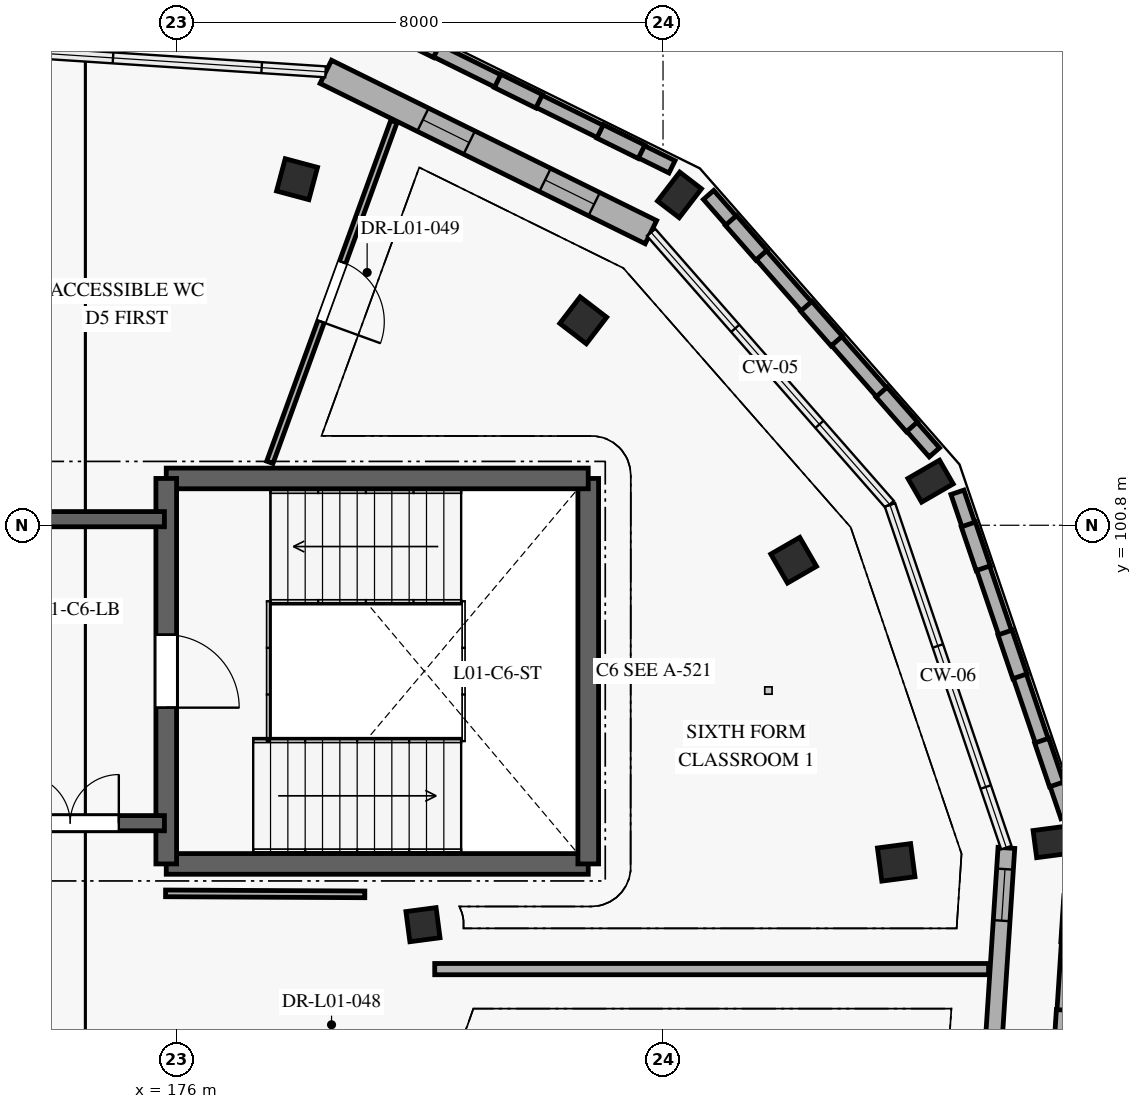
"""IFC4 building model, lengths in metres.
Left out: names, types, materials, properties, quantities, classifications, styles, units other than length and angle.
Written with IfcOpenShell. Run it as: python <this file> out.ifc"""

import sys

from ifc_helpers import new_model, si_unit, direction, frame, frame_2d, origin, origin_2d, place, context, subcontext, project, spatial, rectangle, extrude, element, fill, save


model = new_model("IFC4")
c1 = context("Model", 3, precision=1e-05, world=origin(), true_north=direction((0.0, 1.0)))
c2 = subcontext(c1, "Body", "Model", "MODEL_VIEW")
j1 = project(units=[si_unit("LENGTHUNIT", "METRE"), si_unit("PLANEANGLEUNIT", "RADIAN")], contexts=[c1])
p1 = place(None, origin())
s1 = spatial("IfcSite", under=j1, at=p1, CompositionType="ELEMENT")
p2 = place(p1, origin())
s2 = spatial("IfcBuilding", under=s1, at=p2, CompositionType="ELEMENT")
p3 = place(p2, frame((0.0, 0.0, 4.2)))
s3 = spatial("IfcBuildingStorey", under=s2, at=p3, CompositionType="ELEMENT", Elevation=4.2)
for number, where, z_axis, x_axis in (
    (1, (190.413, 95.595, 0.0), (0.0, 0.0, 1.0), (-0.131, 0.991, 0.0)),
    (2, (188.4, 101.525, 0.0), (0.0, 0.0, 1.0), (-0.5, 0.866, 0.0)),
    (3, (184.271, 106.233, 0.0), (0.0, 0.0, 1.0), (-0.793, 0.609, 0.0)),
):
    element("IfcColumn", number, at=place(p3, frame(where, z_axis=z_axis, x_axis=x_axis)), inside=s3, PredefinedType="PILASTER", context=c2, shape_type="SweptSolid", body=[
        extrude(rectangle(XDim=0.45, YDim=0.6, at=origin_2d()), origin(), (0.0, 0.0, 1.0), 4.2),
    ])
for number, where, z_axis, x_axis in (
    (4, (187.835, 95.256, 0.0), (0.0, 0.0, 1.0), (-0.131, 0.991, 0.0)),
    (5, (186.148, 100.225, 0.0), (0.0, 0.0, 1.0), (-0.5, 0.866, 0.0)),
    (6, (182.688, 104.171, 0.0), (0.0, 0.0, 1.0), (-0.793, 0.609, 0.0)),
    (7, (177.981, 106.492, 0.0), (0.0, 0.0, 1.0), (-0.966, 0.259, 0.0)),
):
    element("IfcColumn", number, at=place(p3, frame(where, z_axis=z_axis, x_axis=x_axis)), inside=s3, PredefinedType="COLUMN", context=c2, shape_type="SweptSolid", body=[
        extrude(rectangle(XDim=0.55, YDim=0.55, at=origin_2d()), origin(), (0.0, 0.0, 1.0), 4.2),
    ])
p4 = place(p3, frame((180.052, 94.231, 0.0), z_axis=(0.0, 0.0, 1.0), x_axis=(0.991444861374, 0.13052619222, 0.0)))
e8 = element("IfcColumn", 8, at=p4, inside=s3, PredefinedType="COLUMN", context=c2, shape_type="SweptSolid", body=[
    extrude(rectangle(XDim=0.5, YDim=0.5, at=origin_2d()), origin(), (0.0, 0.0, 1.0), 4.2),
])
p5 = place(p3, frame((178.454, 108.257, 0.0), z_axis=(0.0, 0.0, 1.0), x_axis=(0.896879104746, -0.442275786664, 0.0)))
e9 = element("IfcWall", 9, at=p5, inside=s3, PredefinedType="SOLIDWALL", context=c2, shape_type="SweptSolid", body=[
    extrude(rectangle(XDim=5.961, YDim=0.425, at=frame_2d((2.98, 0.0))), origin(), (0.0, 0.0, 1.0), 3.94),
])
p6 = place(p5, frame((1.781, 0.0, 0.85)))
e10 = element("IfcOpeningElement", 10, at=p6, cuts=e9, PredefinedType="OPENING", context=c2, shape_type="SweptSolid", body=[
    extrude(rectangle(XDim=0.85, YDim=1.4, at=frame_2d((0.425, 0.7))), frame((0.0, 0.222, 0.0), z_axis=(0.0, -1.0, 0.0), x_axis=(1.0, 0.0, 0.0)), (0.0, 0.0, 1.0), 0.445),
])
p7 = place(p5, frame((4.021, 0.0, 0.85)))
e11 = element("IfcOpeningElement", 11, at=p7, cuts=e9, PredefinedType="OPENING", context=c2, shape_type="SweptSolid", body=[
    extrude(rectangle(XDim=0.9, YDim=1.6, at=frame_2d((0.45, 0.8))), frame((0.0, 0.222, 0.0), z_axis=(0.0, -1.0, 0.0), x_axis=(1.0, 0.0, 0.0)), (0.0, 0.0, 1.0), 0.445),
])
p8 = place(p3, frame((189.647, 95.494, 0.0), z_axis=(0.0, 0.0, 1.0), x_axis=(-0.065407169492, -0.997858658418, 0.0)))
e12 = element("IfcWall", 12, at=p8, inside=s3, PredefinedType="SOLIDWALL", context=c2, shape_type="SweptSolid", body=[
    extrude(rectangle(XDim=5.961, YDim=0.275, at=frame_2d((2.98, 0.0))), origin(), (0.0, 0.0, 1.0), 3.94),
])
p9 = place(p8, frame((0.35, 0.0, 0.85)))
e13 = element("IfcOpeningElement", 13, at=p9, cuts=e12, PredefinedType="OPENING", context=c2, shape_type="SweptSolid", body=[
    extrude(rectangle(XDim=0.85, YDim=1.4, at=frame_2d((0.425, 0.7))), frame((0.0, 0.147, 0.0), z_axis=(0.0, -1.0, 0.0), x_axis=(1.0, 0.0, 0.0)), (0.0, 0.0, 1.0), 0.295),
])
p10 = place(p8, frame((4.021, 0.0, 0.85)))
e14 = element("IfcOpeningElement", 14, at=p10, cuts=e12, PredefinedType="OPENING", context=c2, shape_type="SweptSolid", body=[
    extrude(rectangle(XDim=0.9, YDim=1.8, at=frame_2d((0.45, 0.9))), frame((0.0, 0.147, 0.0), z_axis=(0.0, -1.0, 0.0), x_axis=(1.0, 0.0, 0.0)), (0.0, 0.0, 1.0), 0.295),
])
p11 = place(p3, frame((190.652, 96.009, 0.0), z_axis=(0.0, 0.0, 1.0), x_axis=(-0.321450435893, 0.946926405411, 0.0)))
e15 = element("IfcWall", 15, at=p11, inside=s3, PredefinedType="ELEMENTEDWALL", context=c2, shape_type="SweptSolid", body=[
    extrude(rectangle(XDim=5.632, YDim=0.225, at=frame_2d((2.816, 0.0))), origin(), (0.0, 0.0, 1.0), 1.09),
])
for number, where, z_axis, x_axis in (
    (16, (190.472, 96.538, 1.09), (0.0, 0.0, 1.0), (-0.322, 0.947, 0.0)),
    (17, (189.869, 98.316, 1.09), (0.0, 0.0, 1.0), (-0.321, 0.947, 0.0)),
):
    element("IfcWall", number, at=place(p3, frame(where, z_axis=z_axis, x_axis=x_axis)), inside=s3, PredefinedType="ELEMENTEDWALL", context=c2, shape_type="SweptSolid", body=[
        extrude(rectangle(XDim=0.76, YDim=0.245, at=frame_2d((0.38, 0.0))), origin(), (0.0, 0.0, 1.0), 2.85),
    ])
p12 = place(p3, frame((189.265, 100.094, 1.09), z_axis=(0.0, 0.0, 1.0), x_axis=(-0.321620473335, 0.946868666253, 0.0)))
e18 = element("IfcWall", 18, at=p12, inside=s3, PredefinedType="ELEMENTEDWALL", context=c2, shape_type="SweptSolid", body=[
    extrude(rectangle(XDim=0.76, YDim=0.245, at=frame_2d((0.38, 0.0))), origin(), (0.0, 0.0, 1.0), 2.85),
])
p13 = place(p3, frame((188.462, 101.999, 0.0), z_axis=(0.0, 0.0, 1.0), x_axis=(-0.659363462551, 0.751824330714, 0.0)))
e19 = element("IfcWall", 19, at=p13, inside=s3, PredefinedType="ELEMENTEDWALL", context=c2, shape_type="SweptSolid", body=[
    extrude(rectangle(XDim=5.632, YDim=0.225, at=frame_2d((2.816, 0.0))), origin(), (0.0, 0.0, 1.0), 1.09),
])
p14 = place(p3, frame((188.094, 102.419, 1.09), z_axis=(0.0, 0.0, 1.0), x_axis=(-0.659323125798, 0.751859704857, 0.0)))
e20 = element("IfcWall", 20, at=p14, inside=s3, PredefinedType="ELEMENTEDWALL", context=c2, shape_type="SweptSolid", body=[
    extrude(rectangle(XDim=0.76, YDim=0.245, at=frame_2d((0.38, 0.0))), origin(), (0.0, 0.0, 1.0), 2.85),
])
p15 = place(p3, frame((186.856, 103.83, 1.09), z_axis=(0.0, 0.0, 1.0), x_axis=(-0.659345470196, 0.751840109951, 0.0)))
e21 = element("IfcWall", 21, at=p15, inside=s3, PredefinedType="ELEMENTEDWALL", context=c2, shape_type="SweptSolid", body=[
    extrude(rectangle(XDim=0.76, YDim=0.245, at=frame_2d((0.38, 0.0))), origin(), (0.0, 0.0, 1.0), 2.85),
])
p16 = place(p3, frame((185.618, 105.242, 1.09), z_axis=(0.0, 0.0, 1.0), x_axis=(-0.659504701015, 0.751700438565, 0.0)))
e22 = element("IfcWall", 22, at=p16, inside=s3, PredefinedType="ELEMENTEDWALL", context=c2, shape_type="SweptSolid", body=[
    extrude(rectangle(XDim=0.76, YDim=0.245, at=frame_2d((0.38, 0.0))), origin(), (0.0, 0.0, 1.0), 2.85),
])
p17 = place(p3, frame((184.147, 106.695, 0.0), z_axis=(0.0, 0.0, 1.0), x_axis=(-0.896858387366, 0.442317796398, 0.0)))
e23 = element("IfcWall", 23, at=p17, inside=s3, PredefinedType="ELEMENTEDWALL", context=c2, shape_type="SweptSolid", body=[
    extrude(rectangle(XDim=5.633, YDim=0.225, at=frame_2d((2.816, 0.0))), origin(), (0.0, 0.0, 1.0), 1.09),
])
for number, where, z_axis, x_axis in (
    (24, (183.646, 106.942, 1.09), (0.0, 0.0, 1.0), (-0.897, 0.442, 0.0)),
    (25, (181.962, 107.772, 1.09), (0.0, 0.0, 1.0), (-0.897, 0.442, 0.0)),
    (26, (180.278, 108.603, 1.09), (0.0, 0.0, 1.0), (-0.897, 0.442, 0.0)),
):
    element("IfcWall", number, at=place(p3, frame(where, z_axis=z_axis, x_axis=x_axis)), inside=s3, PredefinedType="ELEMENTEDWALL", context=c2, shape_type="SweptSolid", body=[
        extrude(rectangle(XDim=0.76, YDim=0.245, at=frame_2d((0.38, 0.0))), origin(), (0.0, 0.0, 1.0), 2.85),
    ])
p18 = place(p3, frame((190.382, 89.637, 0.0), z_axis=(0.0, 0.0, 1.0), x_axis=(0.065408478609, 0.997858572607, 0.0)))
e27 = element("IfcWall", 27, at=p18, inside=s3, PredefinedType="ELEMENTEDWALL", context=c2, shape_type="SweptSolid", body=[
    extrude(rectangle(XDim=5.632, YDim=0.225, at=frame_2d((2.816, 0.0))), origin(), (0.0, 0.0, 1.0), 1.09),
])
for number, where, z_axis, x_axis in (
    (28, (190.542, 92.068, 1.09), (0.0, 0.0, 1.0), (0.066, 0.998, 0.0)),
    (29, (190.665, 93.941, 1.09), (0.0, 0.0, 1.0), (0.066, 0.998, 0.0)),
):
    element("IfcWall", number, at=place(p3, frame(where, z_axis=z_axis, x_axis=x_axis)), inside=s3, PredefinedType="ELEMENTEDWALL", context=c2, shape_type="SweptSolid", body=[
        extrude(rectangle(XDim=0.76, YDim=0.245, at=frame_2d((0.38, 0.0))), origin(), (0.0, 0.0, 1.0), 2.85),
    ])
p19 = place(p3, frame((175.83, 95.23, 0.0), z_axis=(0.0, 0.0, 1.0), x_axis=(1.0, 0.0, 0.0)))
e30 = element("IfcWall", 30, at=p19, inside=s3, PredefinedType="SHEAR", context=c2, shape_type="SweptSolid", body=[
    extrude(rectangle(XDim=6.94, YDim=0.34, at=frame_2d((3.47, 0.0))), origin(), (0.0, 0.0, 1.0), 3.95),
])
p20 = place(p3, frame((182.77, 95.23, 0.0), z_axis=(0.0, 0.0, 1.0), x_axis=(0.0, 1.0, 0.0)))
e31 = element("IfcWall", 31, at=p20, inside=s3, PredefinedType="SHEAR", context=c2, shape_type="SweptSolid", body=[
    extrude(rectangle(XDim=6.34, YDim=0.34, at=frame_2d((3.17, 0.0))), origin(), (0.0, 0.0, 1.0), 3.95),
])
p21 = place(p3, frame((182.77, 101.57, 0.0), z_axis=(0.0, 0.0, 1.0), x_axis=(-1.0, 0.0, 0.0)))
e32 = element("IfcWall", 32, at=p21, inside=s3, PredefinedType="SHEAR", context=c2, shape_type="SweptSolid", body=[
    extrude(rectangle(XDim=6.94, YDim=0.34, at=frame_2d((3.47, 0.0))), origin(), (0.0, 0.0, 1.0), 3.95),
])
p22 = place(p3, frame((175.83, 101.57, 0.0), z_axis=(0.0, 0.0, 1.0), x_axis=(0.0, -1.0, 0.0)))
e33 = element("IfcWall", 33, at=p22, inside=s3, PredefinedType="SHEAR", context=c2, shape_type="SweptSolid", body=[
    extrude(rectangle(XDim=6.34, YDim=0.34, at=frame_2d((3.17, 0.0))), origin(), (0.0, 0.0, 1.0), 3.95),
])
p23 = place(p22, frame((2.57, 0.0, 0.0)))
e34 = element("IfcOpeningElement", 34, at=p23, cuts=e33, PredefinedType="OPENING", context=c2, shape_type="SweptSolid", body=[
    extrude(rectangle(XDim=1.2, YDim=2.1, at=frame_2d((0.6, 1.05))), frame((0.0, 0.18, 0.0), z_axis=(0.0, -1.0, 0.0), x_axis=(1.0, 0.0, 0.0)), (0.0, 0.0, 1.0), 0.36),
])
p24 = place(p3, frame((172.7, 95.9, 0.0), z_axis=(0.0, 0.0, 1.0), x_axis=(1.0, 0.0, 0.0)))
e35 = element("IfcWall", 35, at=p24, inside=s3, PredefinedType="SHEAR", context=c2, shape_type="SweptSolid", body=[
    extrude(rectangle(XDim=3.1, YDim=0.25, at=frame_2d((1.55, 0.0))), origin(), (0.0, 0.0, 1.0), 3.95),
])
p25 = place(p24, frame((0.75, 0.0, 0.0)))
e36 = element("IfcOpeningElement", 36, at=p25, cuts=e35, PredefinedType="OPENING", context=c2, shape_type="SweptSolid", body=[
    extrude(rectangle(XDim=1.6, YDim=2.15, at=frame_2d((0.8, 1.075))), frame((0.0, 0.135, 0.0), z_axis=(0.0, -1.0, 0.0), x_axis=(1.0, 0.0, 0.0)), (0.0, 0.0, 1.0), 0.27),
])
p26 = place(p3, frame((175.8, 100.9, 0.0), z_axis=(0.0, 0.0, 1.0), x_axis=(-1.0, 0.0, 0.0)))
e37 = element("IfcWall", 37, at=p26, inside=s3, PredefinedType="SHEAR", context=c2, shape_type="SweptSolid", body=[
    extrude(rectangle(XDim=3.1, YDim=0.25, at=frame_2d((1.55, 0.0))), origin(), (0.0, 0.0, 1.0), 3.95),
])
p27 = place(p3, frame((189.354, 93.5, 0.0), z_axis=(0.0, 0.0, 1.0), x_axis=(-1.0, 0.0, 0.0)))
e38 = element("IfcWall", 38, at=p27, inside=s3, PredefinedType="PARTITIONING", context=c2, shape_type="SweptSolid", body=[
    extrude(rectangle(XDim=9.108, YDim=0.185, at=frame_2d((4.554, 0.0))), origin(), (0.0, 0.0, 1.0), 3.915),
])
p28 = place(p3, frame((179.574, 107.44, 0.0), z_axis=(0.0, 0.0, 1.0), x_axis=(-0.342005953803, -0.939697785228, 0.0)))
e39 = element("IfcWall", 39, at=p28, inside=s3, PredefinedType="PARTITIONING", context=c2, shape_type="SweptSolid", body=[
    extrude(rectangle(XDim=5.965, YDim=0.11, at=frame_2d((2.982, 0.0))), origin(), (0.0, 0.0, 1.0), 3.915),
])
p29 = place(p28, frame((2.462, 0.0, 0.0)))
e40 = element("IfcOpeningElement", 40, at=p29, cuts=e39, PredefinedType="OPENING", context=c2, shape_type="SweptSolid", body=[
    extrude(rectangle(XDim=1.04, YDim=2.1, at=frame_2d((0.52, 1.05))), frame((0.0, 0.065, 0.0), z_axis=(0.0, -1.0, 0.0), x_axis=(1.0, 0.0, 0.0)), (0.0, 0.0, 1.0), 0.13),
])
p30 = place(p3, frame((175.819, 94.746, 0.0), z_axis=(0.0, 0.0, 1.0), x_axis=(0.999987908498, -0.004917606882, 0.0)))
e41 = element("IfcWall", 41, at=p30, inside=s3, PredefinedType="PARTITIONING", context=c2, shape_type="SweptSolid", body=[
    extrude(rectangle(XDim=3.277, YDim=0.11, at=frame_2d((1.638, 0.0))), origin(), (0.0, 0.0, 1.0), 3.915),
])
p31 = place(p6, origin())
e42 = element("IfcWindow", 42, at=p31, inside=s3, PartitioningType="SINGLE_PANEL", PredefinedType="WINDOW", context=c2, shape_type="SweptSolid", body=[
    extrude(rectangle(XDim=0.85, YDim=1.4, at=frame_2d((0.425, 0.7))), frame((0.0, 0.03, 0.0), z_axis=(0.0, -1.0, 0.0), x_axis=(1.0, 0.0, 0.0)), (0.0, 0.0, 1.0), 0.06),
])
fill(e10, e42)
p32 = place(p7, origin())
e43 = element("IfcWindow", 43, at=p32, inside=s3, PartitioningType="SINGLE_PANEL", PredefinedType="WINDOW", context=c2, shape_type="SweptSolid", body=[
    extrude(rectangle(XDim=0.9, YDim=1.6, at=frame_2d((0.45, 0.8))), frame((0.0, 0.03, 0.0), z_axis=(0.0, -1.0, 0.0), x_axis=(1.0, 0.0, 0.0)), (0.0, 0.0, 1.0), 0.06),
])
fill(e11, e43)
p33 = place(p9, origin())
e44 = element("IfcWindow", 44, at=p33, inside=s3, PartitioningType="SINGLE_PANEL", PredefinedType="WINDOW", context=c2, shape_type="SweptSolid", body=[
    extrude(rectangle(XDim=0.85, YDim=1.4, at=frame_2d((0.425, 0.7))), frame((0.0, 0.03, 0.0), z_axis=(0.0, -1.0, 0.0), x_axis=(1.0, 0.0, 0.0)), (0.0, 0.0, 1.0), 0.06),
])
fill(e13, e44)
p34 = place(p23, origin())
e45 = element("IfcDoor", 45, at=p34, inside=s3, OperationType="SINGLE_SWING_RIGHT", PredefinedType="DOOR", context=c2, shape_type="SweptSolid", body=[
    extrude(rectangle(XDim=1.2, YDim=2.1, at=frame_2d((0.6, 1.05))), frame((0.0, 0.025, 0.0), z_axis=(0.0, -1.0, 0.0), x_axis=(1.0, 0.0, 0.0)), (0.0, 0.0, 1.0), 0.05),
])
fill(e34, e45)
p35 = place(p25, origin())
e46 = element("IfcDoor", 46, at=p35, inside=s3, OperationType="DOUBLE_DOOR_SINGLE_SWING", PredefinedType="DOOR", context=c2, shape_type="SweptSolid", body=[
    extrude(rectangle(XDim=1.6, YDim=2.15, at=frame_2d((0.8, 1.075))), frame((0.0, 0.025, 0.0), z_axis=(0.0, -1.0, 0.0), x_axis=(1.0, 0.0, 0.0)), (0.0, 0.0, 1.0), 0.05),
])
fill(e36, e46)
p36 = place(p29, origin())
e47 = element("IfcDoor", 47, at=p36, inside=s3, OperationType="SINGLE_SWING_RIGHT", PredefinedType="DOOR", context=c2, shape_type="SweptSolid", body=[
    extrude(rectangle(XDim=1.04, YDim=2.1, at=frame_2d((0.52, 1.05))), frame((0.0, 0.025, 0.0), z_axis=(0.0, -1.0, 0.0), x_axis=(1.0, 0.0, 0.0)), (0.0, 0.0, 1.0), 0.05),
])
fill(e40, e47)
save(model, sys.argv[1])
